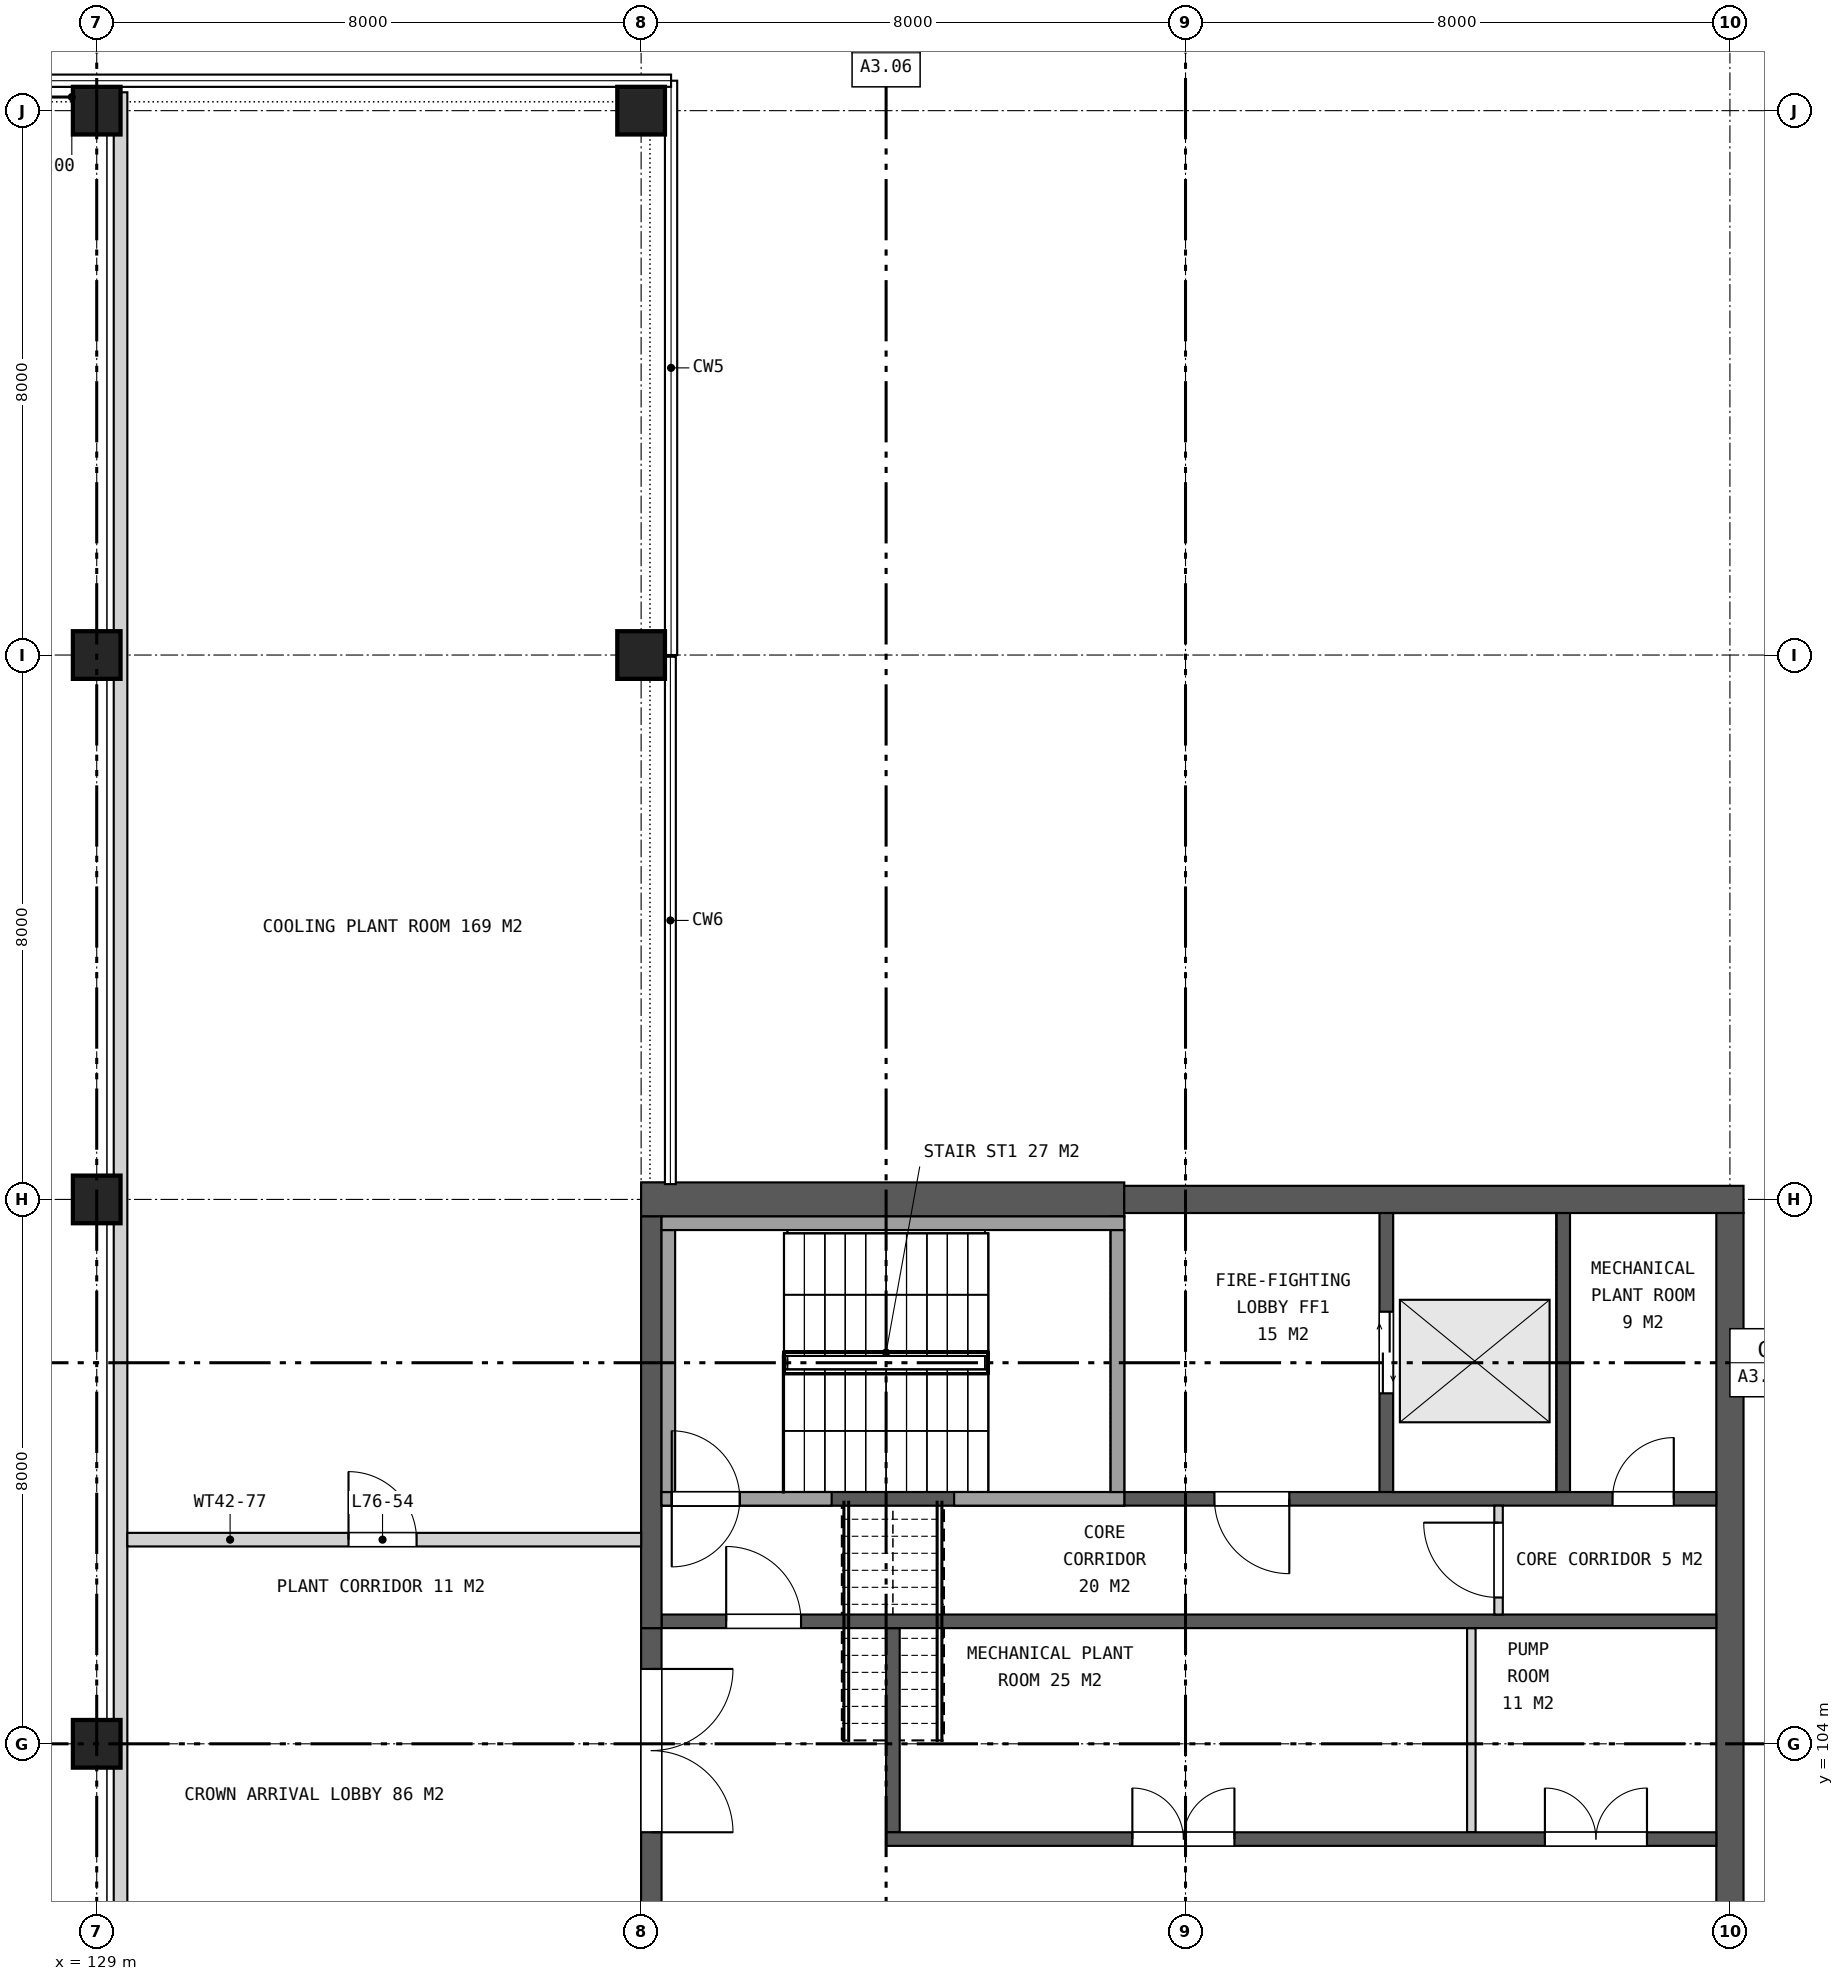
"""IFC4 building model, lengths in metres.
Left out: names, types, materials, properties, quantities, classifications, styles, units other than length and angle.
Written with IfcOpenShell. Run it as: python <this file> out.ifc"""

import sys

from ifc_helpers import new_model, si_unit, direction, frame, frame_2d, origin, origin_2d, place, context, subcontext, project, spatial, rectangle, extrude, element, fill, save


model = new_model("IFC4")
c1 = context("Model", 3, precision=1e-05, world=origin(), true_north=direction((0.0, 1.0)))
c2 = subcontext(c1, "Body", "Model", "MODEL_VIEW")
j1 = project(units=[si_unit("LENGTHUNIT", "METRE"), si_unit("PLANEANGLEUNIT", "RADIAN")], contexts=[c1])
p1 = place(None, origin())
s1 = spatial("IfcSite", under=j1, at=p1, CompositionType="ELEMENT")
p2 = place(p1, origin())
s2 = spatial("IfcBuilding", under=s1, at=p2, CompositionType="ELEMENT")
p3 = place(p2, frame((0.0, 0.0, 349.1)))
s3 = spatial("IfcBuildingStorey", under=s2, at=p3, CompositionType="ELEMENT", Elevation=349.1)
for number, where, z_axis, x_axis in (
    (1, (129.0, 104.0, 0.0), (0.0, 0.0, 1.0), (1.0, 0.0, 0.0)),
    (2, (129.0, 112.0, 0.0), (0.0, 0.0, 1.0), (1.0, 0.0, 0.0)),
    (3, (129.0, 120.0, 0.0), (0.0, 0.0, 1.0), (1.0, 0.0, 0.0)),
    (4, (129.0, 128.0, 0.0), (0.0, 0.0, 1.0), (1.0, 0.0, 0.0)),
    (5, (137.0, 120.0, 0.0), (0.0, 0.0, 1.0), (1.0, 0.0, 0.0)),
    (6, (137.0, 128.0, 0.0), (0.0, 0.0, 1.0), (1.0, 0.0, 0.0)),
):
    element("IfcColumn", number, at=place(p3, frame(where, z_axis=z_axis, x_axis=x_axis)), inside=s3, PredefinedType="COLUMN", context=c2, shape_type="SweptSolid", body=[
        extrude(rectangle(XDim=0.7, YDim=0.7, at=origin_2d()), origin(), (0.0, 0.0, 1.0), 10.23),
    ])
p4 = place(p3, frame((137.0, 112.0, 0.0), z_axis=(0.0, 0.0, 1.0), x_axis=(1.0, 0.0, 0.0)))
e7 = element("IfcWall", 7, at=p4, inside=s3, PredefinedType="SHEAR", context=c2, shape_type="SweptSolid", body=[
    extrude(rectangle(XDim=7.1, YDim=0.5, at=frame_2d((3.55, 0.0))), origin(), (0.0, 0.0, 1.0), 12.0),
])
p5 = place(p3, frame((144.1, 112.0, 0.0), z_axis=(0.0, 0.0, 1.0), x_axis=(1.0, 0.0, 0.0)))
e8 = element("IfcWall", 8, at=p5, inside=s3, PredefinedType="SHEAR", context=c2, shape_type="SweptSolid", body=[
    extrude(rectangle(XDim=9.1, YDim=0.4, at=frame_2d((4.55, 0.0))), origin(), (0.0, 0.0, 1.0), 12.0),
])
p6 = place(p3, frame((153.0, 88.2, 0.0), z_axis=(0.0, 0.0, 1.0), x_axis=(0.0, 1.0, 0.0)))
e9 = element("IfcWall", 9, at=p6, inside=s3, PredefinedType="SHEAR", context=c2, shape_type="SweptSolid", body=[
    extrude(rectangle(XDim=23.6, YDim=0.4, at=frame_2d((11.8, 0.0))), origin(), (0.0, 0.0, 1.0), 12.0),
])
p7 = place(p3, frame((137.15, 94.3, 0.0), z_axis=(0.0, 0.0, 1.0), x_axis=(0.0, 1.0, 0.0)))
e10 = element("IfcWall", 10, at=p7, inside=s3, PredefinedType="SHEAR", context=c2, shape_type="SweptSolid", body=[
    extrude(rectangle(XDim=11.4, YDim=0.3, at=frame_2d((5.7, 0.0))), origin(), (0.0, 0.0, 1.0), 12.0),
])
p8 = place(p7, frame((0.6, 0.0, 0.0)))
e11 = element("IfcOpeningElement", 11, at=p8, cuts=e10, PredefinedType="OPENING", context=c2, shape_type="SweptSolid", body=[
    extrude(rectangle(XDim=2.4, YDim=2.4, at=frame_2d((1.2, 1.2))), frame((0.0, 0.16, 0.0), z_axis=(0.0, -1.0, 0.0), x_axis=(1.0, 0.0, 0.0)), (0.0, 0.0, 1.0), 0.32),
])
p9 = place(p7, frame((4.5, 0.0, 0.0)))
e12 = element("IfcOpeningElement", 12, at=p9, cuts=e10, PredefinedType="OPENING", context=c2, shape_type="SweptSolid", body=[
    extrude(rectangle(XDim=2.4, YDim=2.4, at=frame_2d((1.2, 1.2))), frame((0.0, 0.16, 0.0), z_axis=(0.0, -1.0, 0.0), x_axis=(1.0, 0.0, 0.0)), (0.0, 0.0, 1.0), 0.32),
])
p10 = place(p7, frame((8.4, 0.0, 0.0)))
e13 = element("IfcOpeningElement", 13, at=p10, cuts=e10, PredefinedType="OPENING", context=c2, shape_type="SweptSolid", body=[
    extrude(rectangle(XDim=2.4, YDim=2.4, at=frame_2d((1.2, 1.2))), frame((0.0, 0.16, 0.0), z_axis=(0.0, -1.0, 0.0), x_axis=(1.0, 0.0, 0.0)), (0.0, 0.0, 1.0), 0.32),
])
p11 = place(p3, frame((140.7, 102.7, 0.0), z_axis=(0.0, 0.0, 1.0), x_axis=(0.0, 1.0, 0.0)))
e14 = element("IfcWall", 14, at=p11, inside=s3, PredefinedType="SHEAR", context=c2, shape_type="SweptSolid", body=[
    extrude(rectangle(XDim=3.0, YDim=0.2, at=frame_2d((1.5, 0.0))), origin(), (0.0, 0.0, 1.0), 9.2),
])
p12 = place(p3, frame((149.2, 102.7, 0.0), z_axis=(0.0, 0.0, 1.0), x_axis=(0.0, 1.0, 0.0)))
e15 = element("IfcWall", 15, at=p12, inside=s3, PredefinedType="PARTITIONING", context=c2, shape_type="SweptSolid", body=[
    extrude(rectangle(XDim=3.0, YDim=0.125, at=frame_2d((1.5, 0.0))), origin(), (0.0, 0.0, 1.0), 9.2),
])
p13 = place(p3, frame((140.6, 102.6, 0.0), z_axis=(0.0, 0.0, 1.0), x_axis=(1.0, 0.0, 0.0)))
e16 = element("IfcWall", 16, at=p13, inside=s3, PredefinedType="SHEAR", context=c2, shape_type="SweptSolid", body=[
    extrude(rectangle(XDim=12.2, YDim=0.2, at=frame_2d((6.1, 0.0))), origin(), (0.0, 0.0, 1.0), 9.2),
])
p14 = place(p13, frame((3.619, 0.0, 0.0)))
e17 = element("IfcOpeningElement", 17, at=p14, cuts=e16, PredefinedType="OPENING", context=c2, shape_type="SweptSolid", body=[
    extrude(rectangle(XDim=1.5, YDim=2.1, at=frame_2d((0.75, 1.05))), frame((0.0, 0.11, 0.0), z_axis=(0.0, -1.0, 0.0), x_axis=(1.0, 0.0, 0.0)), (0.0, 0.0, 1.0), 0.22),
])
p15 = place(p13, frame((9.681, 0.0, 0.0)))
e18 = element("IfcOpeningElement", 18, at=p15, cuts=e16, PredefinedType="OPENING", context=c2, shape_type="SweptSolid", body=[
    extrude(rectangle(XDim=1.5, YDim=2.1, at=frame_2d((0.75, 1.05))), frame((0.0, 0.11, 0.0), z_axis=(0.0, -1.0, 0.0), x_axis=(1.0, 0.0, 0.0)), (0.0, 0.0, 1.0), 0.22),
])
p16 = place(p3, frame((137.3, 105.8, 0.0), z_axis=(0.0, 0.0, 1.0), x_axis=(1.0, 0.0, 0.0)))
e19 = element("IfcWall", 19, at=p16, inside=s3, PredefinedType="SHEAR", context=c2, shape_type="SweptSolid", body=[
    extrude(rectangle(XDim=15.5, YDim=0.2, at=frame_2d((7.75, 0.0))), origin(), (0.0, 0.0, 1.0), 9.2),
])
p17 = place(p16, frame((0.95, 0.0, 0.0)))
e20 = element("IfcOpeningElement", 20, at=p17, cuts=e19, PredefinedType="OPENING", context=c2, shape_type="SweptSolid", body=[
    extrude(rectangle(XDim=1.1, YDim=2.1, at=frame_2d((0.55, 1.05))), frame((0.0, 0.11, 0.0), z_axis=(0.0, -1.0, 0.0), x_axis=(1.0, 0.0, 0.0)), (0.0, 0.0, 1.0), 0.22),
])
p18 = place(p3, frame((137.15, 105.7, 0.0), z_axis=(0.0, 0.0, 1.0), x_axis=(0.0, 1.0, 0.0)))
e21 = element("IfcWall", 21, at=p18, inside=s3, PredefinedType="SHEAR", context=c2, shape_type="SweptSolid", body=[
    extrude(rectangle(XDim=6.05, YDim=0.3, at=frame_2d((3.025, 0.0))), origin(), (0.0, 0.0, 1.0), 12.0),
])
p19 = place(p3, frame((144.0, 107.7, 0.0), z_axis=(0.0, 0.0, 1.0), x_axis=(0.0, 1.0, 0.0)))
e22 = element("IfcWall", 22, at=p19, inside=s3, PredefinedType="SHEAR", context=c2, shape_type="SweptSolid", body=[
    extrude(rectangle(XDim=4.05, YDim=0.2, at=frame_2d((2.025, 0.0))), origin(), (0.0, 0.0, 1.0), 11.6),
])
p20 = place(p3, frame((147.95, 107.7, 0.0), z_axis=(0.0, 0.0, 1.0), x_axis=(0.0, 1.0, 0.0)))
e23 = element("IfcWall", 23, at=p20, inside=s3, PredefinedType="SHEAR", context=c2, shape_type="SweptSolid", body=[
    extrude(rectangle(XDim=4.1, YDim=0.2, at=frame_2d((2.05, 0.0))), origin(), (0.0, 0.0, 1.0), 9.2),
])
p21 = place(p20, frame((1.45, 0.0, 0.0)))
e24 = element("IfcOpeningElement", 24, at=p21, cuts=e23, PredefinedType="OPENING", context=c2, shape_type="SweptSolid", body=[
    extrude(rectangle(XDim=1.2, YDim=2.1, at=frame_2d((0.6, 1.05))), frame((0.0, 0.11, 0.0), z_axis=(0.0, -1.0, 0.0), x_axis=(1.0, 0.0, 0.0)), (0.0, 0.0, 1.0), 0.22),
])
p22 = place(p3, frame((150.55, 107.7, 0.0), z_axis=(0.0, 0.0, 1.0), x_axis=(0.0, 1.0, 0.0)))
e25 = element("IfcWall", 25, at=p22, inside=s3, PredefinedType="SHEAR", context=c2, shape_type="SweptSolid", body=[
    extrude(rectangle(XDim=4.1, YDim=0.2, at=frame_2d((2.05, 0.0))), origin(), (0.0, 0.0, 1.0), 9.2),
])
p23 = place(p3, frame((137.3, 107.6, 0.0), z_axis=(0.0, 0.0, 1.0), x_axis=(1.0, 0.0, 0.0)))
e26 = element("IfcWall", 26, at=p23, inside=s3, PredefinedType="SHEAR", context=c2, shape_type="SweptSolid", body=[
    extrude(rectangle(XDim=6.8, YDim=0.2, at=frame_2d((3.4, 0.0))), origin(), (0.0, 0.0, 1.0), 11.6),
])
p24 = place(p23, frame((0.15, 0.0, 0.0)))
e27 = element("IfcOpeningElement", 27, at=p24, cuts=e26, PredefinedType="OPENING", context=c2, shape_type="SweptSolid", body=[
    extrude(rectangle(XDim=1.0, YDim=2.1, at=frame_2d((0.5, 1.05))), frame((0.0, 0.11, 0.0), z_axis=(0.0, -1.0, 0.0), x_axis=(1.0, 0.0, 0.0)), (0.0, 0.0, 1.0), 0.22),
])
p25 = place(p23, frame((0.15, 0.0, 9.2)))
e28 = element("IfcOpeningElement", 28, at=p25, cuts=e26, PredefinedType="OPENING", context=c2, shape_type="SweptSolid", body=[
    extrude(rectangle(XDim=1.0, YDim=2.1, at=frame_2d((0.5, 1.05))), frame((0.0, 0.11, 0.0), z_axis=(0.0, -1.0, 0.0), x_axis=(1.0, 0.0, 0.0)), (0.0, 0.0, 1.0), 0.22),
])
p26 = place(p3, frame((144.1, 107.6, 0.0), z_axis=(0.0, 0.0, 1.0), x_axis=(1.0, 0.0, 0.0)))
e29 = element("IfcWall", 29, at=p26, inside=s3, PredefinedType="SHEAR", context=c2, shape_type="SweptSolid", body=[
    extrude(rectangle(XDim=8.7, YDim=0.2, at=frame_2d((4.35, 0.0))), origin(), (0.0, 0.0, 1.0), 9.2),
])
p27 = place(p26, frame((1.325, 0.0, 0.0)))
e30 = element("IfcOpeningElement", 30, at=p27, cuts=e29, PredefinedType="OPENING", context=c2, shape_type="SweptSolid", body=[
    extrude(rectangle(XDim=1.1, YDim=2.1, at=frame_2d((0.55, 1.05))), frame((0.0, 0.11, 0.0), z_axis=(0.0, -1.0, 0.0), x_axis=(1.0, 0.0, 0.0)), (0.0, 0.0, 1.0), 0.22),
])
p28 = place(p26, frame((7.175, 0.0, 0.0)))
e31 = element("IfcOpeningElement", 31, at=p28, cuts=e29, PredefinedType="OPENING", context=c2, shape_type="SweptSolid", body=[
    extrude(rectangle(XDim=0.9, YDim=2.1, at=frame_2d((0.45, 1.05))), frame((0.0, 0.11, 0.0), z_axis=(0.0, -1.0, 0.0), x_axis=(1.0, 0.0, 0.0)), (0.0, 0.0, 1.0), 0.22),
])
p29 = place(p3, frame((149.6, 105.9, 0.0), z_axis=(0.0, 0.0, 1.0), x_axis=(0.0, 1.0, 0.0)))
e32 = element("IfcWall", 32, at=p29, inside=s3, PredefinedType="PARTITIONING", context=c2, shape_type="SweptSolid", body=[
    extrude(rectangle(XDim=1.6, YDim=0.125, at=frame_2d((0.8, 0.0))), origin(), (0.0, 0.0, 1.0), 9.2),
])
p30 = place(p29, frame((0.25, 0.0, 0.0)))
e33 = element("IfcOpeningElement", 33, at=p30, cuts=e32, PredefinedType="OPENING", context=c2, shape_type="SweptSolid", body=[
    extrude(rectangle(XDim=1.1, YDim=2.1, at=frame_2d((0.55, 1.05))), frame((0.0, 0.073, 0.0), z_axis=(0.0, -1.0, 0.0), x_axis=(1.0, 0.0, 0.0)), (0.0, 0.0, 1.0), 0.145),
])
p31 = place(p3, frame((129.35, 71.73, 0.0), z_axis=(0.0, 0.0, 1.0), x_axis=(0.0, 1.0, 0.0)))
e34 = element("IfcWall", 34, at=p31, inside=s3, PredefinedType="SOLIDWALL", context=c2, shape_type="SweptSolid", body=[
    extrude(rectangle(XDim=56.54, YDim=0.2, at=frame_2d((28.27, 0.0))), origin(), (0.0, 0.0, 1.0), 11.6),
])
p32 = place(p31, frame((27.32, 0.0, 0.0)))
e35 = element("IfcOpeningElement", 35, at=p32, cuts=e34, PredefinedType="OPENING", context=c2, shape_type="SweptSolid", body=[
    extrude(rectangle(XDim=1.8, YDim=2.1, at=frame_2d((0.9, 1.05))), frame((0.0, 0.11, 0.0), z_axis=(0.0, -1.0, 0.0), x_axis=(1.0, 0.0, 0.0)), (0.0, 0.0, 1.0), 0.22),
])
p33 = place(p3, frame((129.45, 107.0, 0.0), z_axis=(0.0, 0.0, 1.0), x_axis=(1.0, 0.0, 0.0)))
e36 = element("IfcWall", 36, at=p33, inside=s3, PredefinedType="SOLIDWALL", context=c2, shape_type="SweptSolid", body=[
    extrude(rectangle(XDim=7.55, YDim=0.2, at=frame_2d((3.775, 0.0))), origin(), (0.0, 0.0, 1.0), 11.6),
])
p34 = place(p33, frame((3.25, 0.0, 0.0)))
e37 = element("IfcOpeningElement", 37, at=p34, cuts=e36, PredefinedType="OPENING", context=c2, shape_type="SweptSolid", body=[
    extrude(rectangle(XDim=1.0, YDim=2.1, at=frame_2d((0.5, 1.05))), frame((0.0, 0.11, 0.0), z_axis=(0.0, -1.0, 0.0), x_axis=(1.0, 0.0, 0.0)), (0.0, 0.0, 1.0), 0.22),
])
p35 = place(p10, frame((2.4, 0.0, 0.0), z_axis=(0.0, 0.0, 1.0), x_axis=(-1.0, 0.0, 0.0)))
e38 = element("IfcDoor", 38, at=p35, inside=s3, OperationType="DOUBLE_DOOR_SINGLE_SWING", PredefinedType="DOOR", context=c2, shape_type="SweptSolid", body=[
    extrude(rectangle(XDim=2.4, YDim=2.4, at=frame_2d((1.2, 1.2))), frame((0.0, 0.025, 0.0), z_axis=(0.0, -1.0, 0.0), x_axis=(1.0, 0.0, 0.0)), (0.0, 0.0, 1.0), 0.05),
])
fill(e13, e38)
p36 = place(p14, origin())
e39 = element("IfcDoor", 39, at=p36, inside=s3, OperationType="DOUBLE_DOOR_SINGLE_SWING", PredefinedType="DOOR", context=c2, shape_type="SweptSolid", body=[
    extrude(rectangle(XDim=1.5, YDim=2.1, at=frame_2d((0.75, 1.05))), frame((0.0, 0.025, 0.0), z_axis=(0.0, -1.0, 0.0), x_axis=(1.0, 0.0, 0.0)), (0.0, 0.0, 1.0), 0.05),
])
fill(e17, e39)
p37 = place(p15, origin())
e40 = element("IfcDoor", 40, at=p37, inside=s3, OperationType="DOUBLE_DOOR_SINGLE_SWING", PredefinedType="DOOR", context=c2, shape_type="SweptSolid", body=[
    extrude(rectangle(XDim=1.5, YDim=2.1, at=frame_2d((0.75, 1.05))), frame((0.0, 0.025, 0.0), z_axis=(0.0, -1.0, 0.0), x_axis=(1.0, 0.0, 0.0)), (0.0, 0.0, 1.0), 0.05),
])
fill(e18, e40)
p38 = place(p17, origin())
e41 = element("IfcDoor", 41, at=p38, inside=s3, OperationType="SINGLE_SWING_LEFT", PredefinedType="DOOR", context=c2, shape_type="SweptSolid", body=[
    extrude(rectangle(XDim=1.1, YDim=2.1, at=frame_2d((0.55, 1.05))), frame((0.0, 0.025, 0.0), z_axis=(0.0, -1.0, 0.0), x_axis=(1.0, 0.0, 0.0)), (0.0, 0.0, 1.0), 0.05),
])
fill(e20, e41)
p39 = place(p21, origin())
e42 = element("IfcDoor", 42, at=p39, inside=s3, OperationType="DOUBLE_DOOR_SLIDING", PredefinedType="DOOR", context=c2, shape_type="SweptSolid", body=[
    extrude(rectangle(XDim=1.2, YDim=2.1, at=frame_2d((0.6, 1.05))), frame((0.0, 0.025, 0.0), z_axis=(0.0, -1.0, 0.0), x_axis=(1.0, 0.0, 0.0)), (0.0, 0.0, 1.0), 0.05),
])
fill(e24, e42)
p40 = place(p24, origin())
e43 = element("IfcDoor", 43, at=p40, inside=s3, OperationType="SINGLE_SWING_LEFT", PredefinedType="DOOR", context=c2, shape_type="SweptSolid", body=[
    extrude(rectangle(XDim=1.0, YDim=2.1, at=frame_2d((0.5, 1.05))), frame((0.0, 0.025, 0.0), z_axis=(0.0, -1.0, 0.0), x_axis=(1.0, 0.0, 0.0)), (0.0, 0.0, 1.0), 0.05),
])
fill(e27, e43)
p41 = place(p25, frame((1.0, 0.0, 0.0), z_axis=(0.0, 0.0, 1.0), x_axis=(-1.0, 0.0, 0.0)))
e44 = element("IfcDoor", 44, at=p41, inside=s3, OperationType="SINGLE_SWING_RIGHT", PredefinedType="DOOR", context=c2, shape_type="SweptSolid", body=[
    extrude(rectangle(XDim=1.0, YDim=2.1, at=frame_2d((0.5, 1.05))), frame((0.0, 0.025, 0.0), z_axis=(0.0, -1.0, 0.0), x_axis=(1.0, 0.0, 0.0)), (0.0, 0.0, 1.0), 0.05),
])
fill(e28, e44)
p42 = place(p27, frame((1.1, 0.0, 0.0), z_axis=(0.0, 0.0, 1.0), x_axis=(-1.0, 0.0, 0.0)))
e45 = element("IfcDoor", 45, at=p42, inside=s3, OperationType="SINGLE_SWING_LEFT", PredefinedType="DOOR", context=c2, shape_type="SweptSolid", body=[
    extrude(rectangle(XDim=1.1, YDim=2.1, at=frame_2d((0.55, 1.05))), frame((0.0, 0.025, 0.0), z_axis=(0.0, -1.0, 0.0), x_axis=(1.0, 0.0, 0.0)), (0.0, 0.0, 1.0), 0.05),
])
fill(e30, e45)
p43 = place(p28, origin())
e46 = element("IfcDoor", 46, at=p43, inside=s3, OperationType="SINGLE_SWING_RIGHT", PredefinedType="DOOR", context=c2, shape_type="SweptSolid", body=[
    extrude(rectangle(XDim=0.9, YDim=2.1, at=frame_2d((0.45, 1.05))), frame((0.0, 0.025, 0.0), z_axis=(0.0, -1.0, 0.0), x_axis=(1.0, 0.0, 0.0)), (0.0, 0.0, 1.0), 0.05),
])
fill(e31, e46)
p44 = place(p30, origin())
e47 = element("IfcDoor", 47, at=p44, inside=s3, OperationType="SINGLE_SWING_RIGHT", PredefinedType="DOOR", context=c2, shape_type="SweptSolid", body=[
    extrude(rectangle(XDim=1.1, YDim=2.1, at=frame_2d((0.55, 1.05))), frame((0.0, 0.025, 0.0), z_axis=(0.0, -1.0, 0.0), x_axis=(1.0, 0.0, 0.0)), (0.0, 0.0, 1.0), 0.05),
])
fill(e33, e47)
p45 = place(p34, origin())
e48 = element("IfcDoor", 48, at=p45, inside=s3, OperationType="SINGLE_SWING_LEFT", PredefinedType="DOOR", context=c2, shape_type="SweptSolid", body=[
    extrude(rectangle(XDim=1.0, YDim=2.1, at=frame_2d((0.5, 1.05))), frame((0.0, 0.025, 0.0), z_axis=(0.0, -1.0, 0.0), x_axis=(1.0, 0.0, 0.0)), (0.0, 0.0, 1.0), 0.05),
])
fill(e37, e48)
save(model, sys.argv[1])
